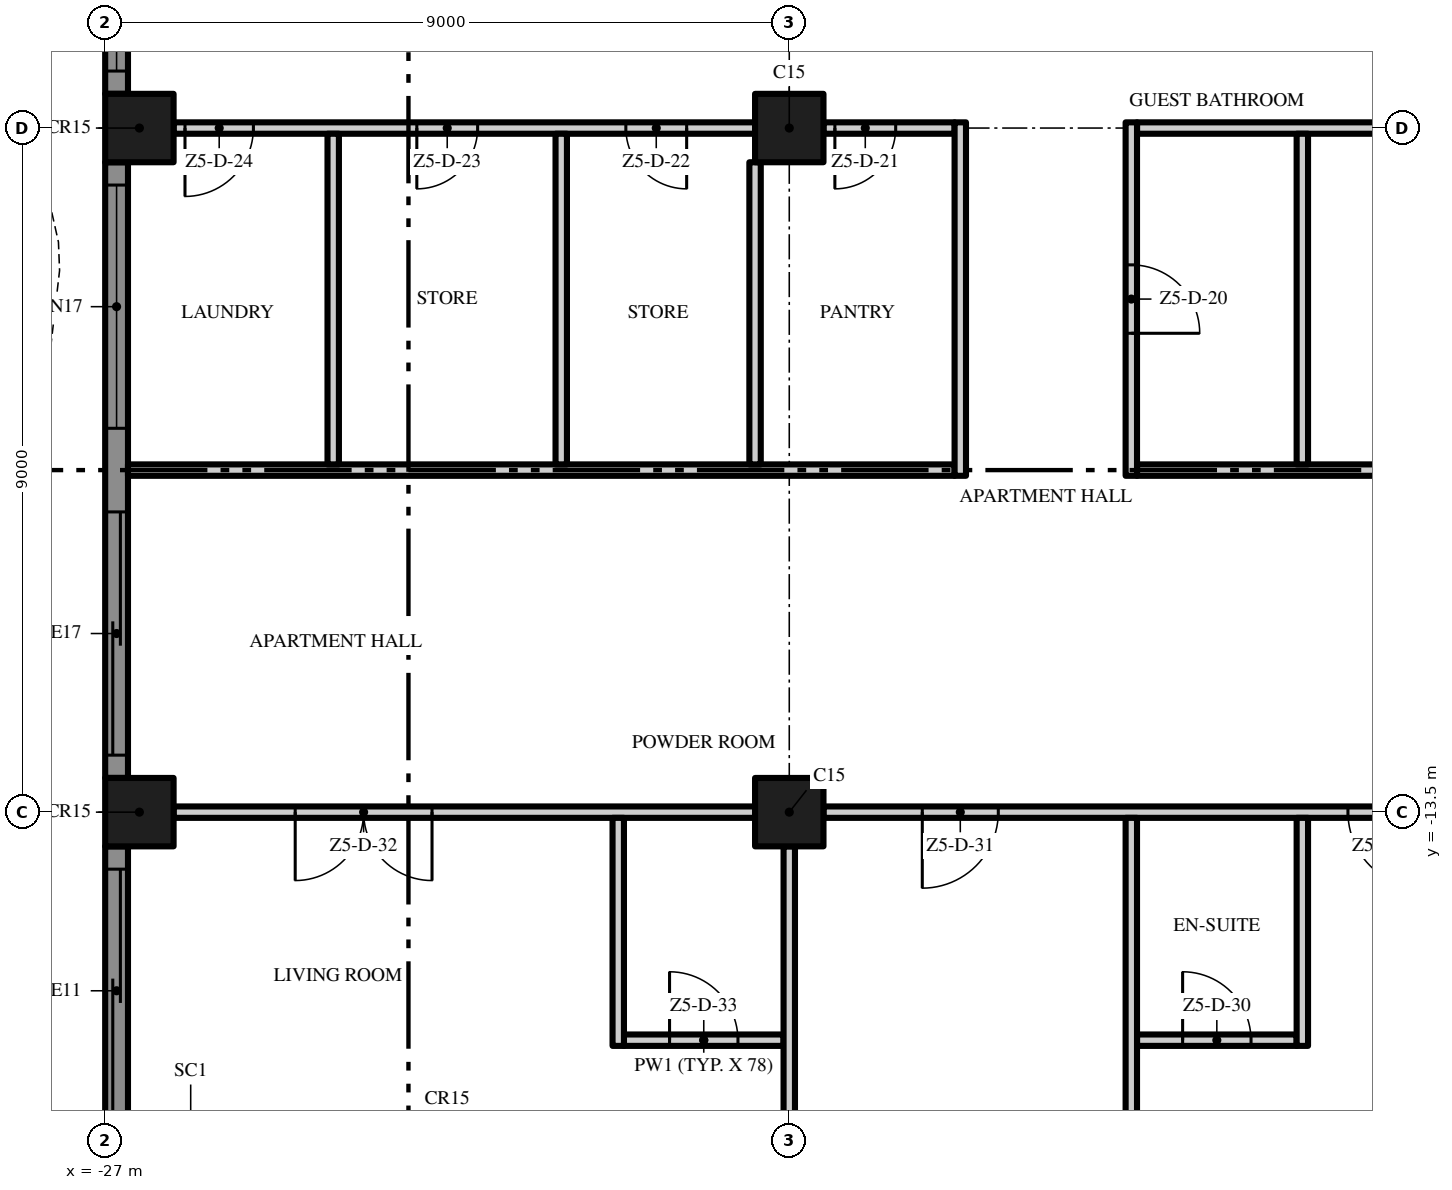
"""IFC4 building model, lengths in metres.
Left out: names, types, materials, properties, quantities, classifications, styles, units other than length and angle.
Written with IfcOpenShell. Run it as: python <this file> out.ifc"""

import sys

from ifc_helpers import new_model, si_unit, direction, frame, frame_2d, origin, origin_2d, place, context, subcontext, project, spatial, polyline, rectangle, outline, extrude, element, fill, save


model = new_model("IFC4")
c1 = context("Model", 3, precision=1e-05, world=origin(), true_north=direction((0.0, 1.0)))
c2 = subcontext(c1, "Body", "Model", "MODEL_VIEW")
j1 = project(units=[si_unit("LENGTHUNIT", "METRE"), si_unit("PLANEANGLEUNIT", "RADIAN")], contexts=[c1])
p1 = place(None, origin())
s1 = spatial("IfcSite", under=j1, at=p1, CompositionType="ELEMENT")
p2 = place(p1, origin())
s2 = spatial("IfcBuilding", under=s1, at=p2, CompositionType="ELEMENT")
p3 = place(p2, frame((0.0, 0.0, 276.8)))
s3 = spatial("IfcBuildingStorey", under=s2, at=p3, CompositionType="ELEMENT", Elevation=276.8)
for number, where, z_axis, x_axis in (
    (1, (-18.0, -13.5, 0.0), (0.0, 0.0, 1.0), (1.0, 0.0, 0.0)),
    (2, (-18.0, -4.5, 0.0), (0.0, 0.0, 1.0), (1.0, 0.0, 0.0)),
    (3, (-26.55, -13.5, 0.0), (0.0, 0.0, 1.0), (1.0, 0.0, 0.0)),
    (4, (-26.55, -4.5, 0.0), (0.0, 0.0, 1.0), (1.0, 0.0, 0.0)),
):
    element("IfcColumn", number, at=place(p3, frame(where, z_axis=z_axis, x_axis=x_axis)), inside=s3, PredefinedType="COLUMN", context=c2, shape_type="SweptSolid", body=[
        extrude(rectangle(XDim=0.9, YDim=0.9, at=origin_2d()), origin(), (0.0, 0.0, 1.0), 3.5),
    ])
p4 = place(p3, frame((-26.85, -4.05, 0.0), z_axis=(0.0, 0.0, 1.0), x_axis=(0.0, 1.0, 0.0)))
e5 = element("IfcWall", 5, at=p4, inside=s3, PredefinedType="SOLIDWALL", context=c2, shape_type="SweptSolid", body=[
    extrude(rectangle(XDim=8.1, YDim=0.3, at=frame_2d((4.05, 0.0))), origin(), (0.0, 0.0, 1.0), 3.5),
])
p5 = place(p4, frame((4.6, 0.0, 0.0)))
e6 = element("IfcOpeningElement", 6, at=p5, cuts=e5, PredefinedType="OPENING", context=c2, shape_type="SweptSolid", body=[
    extrude(rectangle(XDim=3.2, YDim=2.4, at=frame_2d((1.6, 1.2))), frame((0.0, 0.16, 0.0), z_axis=(0.0, -1.0, 0.0), x_axis=(1.0, 0.0, 0.0)), (0.0, 0.0, 1.0), 0.32),
])
p6 = place(p4, frame((0.3, 0.0, 0.45)))
e7 = element("IfcOpeningElement", 7, at=p6, cuts=e5, PredefinedType="OPENING", context=c2, shape_type="SweptSolid", body=[
    extrude(rectangle(XDim=3.2, YDim=2.65, at=frame_2d((1.6, 1.325))), frame((0.0, 0.16, 0.0), z_axis=(0.0, -1.0, 0.0), x_axis=(1.0, 0.0, 0.0)), (0.0, 0.0, 1.0), 0.32),
])
p7 = place(p3, frame((-26.85, -13.05, 0.0), z_axis=(0.0, 0.0, 1.0), x_axis=(0.0, 1.0, 0.0)))
e8 = element("IfcWall", 8, at=p7, inside=s3, PredefinedType="SOLIDWALL", context=c2, shape_type="SweptSolid", body=[
    extrude(rectangle(XDim=8.1, YDim=0.3, at=frame_2d((4.05, 0.0))), origin(), (0.0, 0.0, 1.0), 3.5),
])
p8 = place(p7, frame((4.6, 0.0, 0.45)))
e9 = element("IfcOpeningElement", 9, at=p8, cuts=e8, PredefinedType="OPENING", context=c2, shape_type="SweptSolid", body=[
    extrude(rectangle(XDim=3.2, YDim=2.65, at=frame_2d((1.6, 1.325))), frame((0.0, 0.16, 0.0), z_axis=(0.0, -1.0, 0.0), x_axis=(1.0, 0.0, 0.0)), (0.0, 0.0, 1.0), 0.32),
])
p9 = place(p7, frame((0.3, 0.0, 0.0)))
e10 = element("IfcOpeningElement", 10, at=p9, cuts=e8, PredefinedType="OPENING", context=c2, shape_type="SweptSolid", body=[
    extrude(rectangle(XDim=3.2, YDim=2.4, at=frame_2d((1.6, 1.2))), frame((0.0, 0.16, 0.0), z_axis=(0.0, -1.0, 0.0), x_axis=(1.0, 0.0, 0.0)), (0.0, 0.0, 1.0), 0.32),
])
p10 = place(p3, frame((-26.85, -18.0, 0.0), z_axis=(0.0, 0.0, 1.0), x_axis=(0.0, 1.0, 0.0)))
e11 = element("IfcWall", 11, at=p10, inside=s3, PredefinedType="SOLIDWALL", context=c2, shape_type="SweptSolid", body=[
    extrude(rectangle(XDim=4.05, YDim=0.3, at=frame_2d((2.025, 0.0))), origin(), (0.0, 0.0, 1.0), 3.5),
])
p11 = place(p10, frame((0.55, 0.0, 0.0)))
e12 = element("IfcOpeningElement", 12, at=p11, cuts=e11, PredefinedType="OPENING", context=c2, shape_type="SweptSolid", body=[
    extrude(rectangle(XDim=3.2, YDim=2.4, at=frame_2d((1.6, 1.2))), frame((0.0, 0.16, 0.0), z_axis=(0.0, -1.0, 0.0), x_axis=(1.0, 0.0, 0.0)), (0.0, 0.0, 1.0), 0.32),
])
p12 = place(p3, origin())
e13 = element("IfcWall", 13, at=p12, inside=s3, PredefinedType="USERDEFINED", context=c2, shape_type="SweptSolid", body=[
    extrude(outline(polyline([(-29.649, 18.0), (-29.985, 16.5), (-30.0, 16.125), (-29.869, 15.0), (-29.345, 13.5), (-28.612, 12.0), (-27.951, 10.5), (-27.615, 9.0), (-27.6, 8.625), (-27.731, 7.5), (-28.255, 6.0), (-28.988, 4.5), (-29.649, 3.0), (-29.985, 1.5), (-30.0, 1.125), (-29.869, 0.0), (-29.345, -1.5), (-28.612, -3.0), (-27.951, -4.5), (-27.615, -6.0), (-27.6, -6.375), (-27.731, -7.5), (-28.255, -9.0), (-28.988, -10.5), (-29.649, -12.0), (-29.985, -13.5), (-30.0, -13.875), (-29.869, -15.0), (-29.345, -16.5), (-28.612, -18.0), (-28.388, -17.89), (-29.114, -16.404), (-29.624, -14.944), (-29.749, -13.865), (-29.736, -13.533), (-29.41, -12.079), (-28.761, -10.605), (-28.024, -9.096), (-27.486, -7.556), (-27.349, -6.385), (-27.366, -5.967), (-27.713, -4.421), (-28.385, -2.895), (-29.114, -1.404), (-29.624, 0.056), (-29.749, 1.135), (-29.736, 1.467), (-29.41, 2.921), (-28.761, 4.395), (-28.024, 5.904), (-27.486, 7.444), (-27.349, 8.615), (-27.366, 9.033), (-27.713, 10.579), (-28.385, 12.105), (-29.114, 13.596), (-29.624, 15.056), (-29.749, 16.135), (-29.736, 16.467), (-29.405, 17.945), (-29.649, 18.0)])), origin(), (0.0, 0.0, 1.0), 0.9),
])
p13 = place(p3, frame((-20.175, -16.5, 0.0), z_axis=(0.0, 0.0, 1.0), x_axis=(1.0, 0.0, 0.0)))
e14 = element("IfcWall", 14, at=p13, inside=s3, PredefinedType="PARTITIONING", context=c2, shape_type="SweptSolid", body=[
    extrude(rectangle(XDim=2.1, YDim=0.15, at=frame_2d((1.05, 0.0))), origin(), (0.0, 0.0, 1.0), 3.5),
])
p14 = place(p13, frame((0.6, 0.0, 0.0)))
e15 = element("IfcOpeningElement", 15, at=p14, cuts=e14, PredefinedType="OPENING", context=c2, shape_type="SweptSolid", body=[
    extrude(rectangle(XDim=0.9, YDim=2.1, at=frame_2d((0.45, 1.05))), frame((0.0, 0.085, 0.0), z_axis=(0.0, -1.0, 0.0), x_axis=(1.0, 0.0, 0.0)), (0.0, 0.0, 1.0), 0.17),
])
p15 = place(p3, frame((-13.425, -16.5, 0.0), z_axis=(0.0, 0.0, 1.0), x_axis=(1.0, 0.0, 0.0)))
e16 = element("IfcWall", 16, at=p15, inside=s3, PredefinedType="PARTITIONING", context=c2, shape_type="SweptSolid", body=[
    extrude(rectangle(XDim=2.1, YDim=0.15, at=frame_2d((1.05, 0.0))), origin(), (0.0, 0.0, 1.0), 3.5),
])
p16 = place(p15, frame((0.6, 0.0, 0.0)))
e17 = element("IfcOpeningElement", 17, at=p16, cuts=e16, PredefinedType="OPENING", context=c2, shape_type="SweptSolid", body=[
    extrude(rectangle(XDim=0.9, YDim=2.1, at=frame_2d((0.45, 1.05))), frame((0.0, 0.085, 0.0), z_axis=(0.0, -1.0, 0.0), x_axis=(1.0, 0.0, 0.0)), (0.0, 0.0, 1.0), 0.17),
])
p17 = place(p3, frame((-18.45, -13.5, 0.0), z_axis=(0.0, 0.0, 1.0), x_axis=(-1.0, 0.0, 0.0)))
e18 = element("IfcWall", 18, at=p17, inside=s3, PredefinedType="PARTITIONING", context=c2, shape_type="SweptSolid", body=[
    extrude(rectangle(XDim=7.65, YDim=0.15, at=frame_2d((3.825, 0.0))), origin(), (0.0, 0.0, 1.0), 3.5),
])
p18 = place(p17, frame((4.25, 0.0, 0.0)))
e19 = element("IfcOpeningElement", 19, at=p18, cuts=e18, PredefinedType="OPENING", context=c2, shape_type="SweptSolid", body=[
    extrude(rectangle(XDim=1.8, YDim=2.4, at=frame_2d((0.9, 1.2))), frame((0.0, 0.085, 0.0), z_axis=(0.0, -1.0, 0.0), x_axis=(1.0, 0.0, 0.0)), (0.0, 0.0, 1.0), 0.17),
])
p19 = place(p3, frame((-9.45, -13.5, 0.0), z_axis=(0.0, 0.0, 1.0), x_axis=(-1.0, 0.0, 0.0)))
e20 = element("IfcWall", 20, at=p19, inside=s3, PredefinedType="PARTITIONING", context=c2, shape_type="SweptSolid", body=[
    extrude(rectangle(XDim=8.1, YDim=0.15, at=frame_2d((4.05, 0.0))), origin(), (0.0, 0.0, 1.0), 3.5),
])
p20 = place(p19, frame((0.2, 0.0, 0.0)))
e21 = element("IfcOpeningElement", 21, at=p20, cuts=e20, PredefinedType="OPENING", context=c2, shape_type="SweptSolid", body=[
    extrude(rectangle(XDim=1.0, YDim=2.4, at=frame_2d((0.5, 1.2))), frame((0.0, 0.085, 0.0), z_axis=(0.0, -1.0, 0.0), x_axis=(1.0, 0.0, 0.0)), (0.0, 0.0, 1.0), 0.17),
])
p21 = place(p19, frame((5.8, 0.0, 0.0)))
e22 = element("IfcOpeningElement", 22, at=p21, cuts=e20, PredefinedType="OPENING", context=c2, shape_type="SweptSolid", body=[
    extrude(rectangle(XDim=1.0, YDim=2.4, at=frame_2d((0.5, 1.2))), frame((0.0, 0.085, 0.0), z_axis=(0.0, -1.0, 0.0), x_axis=(1.0, 0.0, 0.0)), (0.0, 0.0, 1.0), 0.17),
])
p22 = place(p3, frame((-26.7, -9.0, 0.0), z_axis=(0.0, 0.0, 1.0), x_axis=(1.0, 0.0, 0.0)))
e23 = element("IfcWall", 23, at=p22, inside=s3, PredefinedType="PARTITIONING", context=c2, shape_type="SweptSolid", body=[
    extrude(rectangle(XDim=10.875, YDim=0.15, at=frame_2d((5.438, 0.0))), origin(), (0.0, 0.0, 1.0), 3.5),
])
p23 = place(p3, frame((-13.425, -9.0, 0.0), z_axis=(0.0, 0.0, 1.0), x_axis=(1.0, 0.0, 0.0)))
e24 = element("IfcWall", 24, at=p23, inside=s3, PredefinedType="PARTITIONING", context=c2, shape_type="SweptSolid", body=[
    extrude(rectangle(XDim=13.325, YDim=0.15, at=frame_2d((6.662, 0.0))), origin(), (0.0, 0.0, 1.0), 3.5),
])
p24 = place(p23, frame((4.675, 0.0, 0.0)))
e25 = element("IfcOpeningElement", 25, at=p24, cuts=e24, PredefinedType="OPENING", context=c2, shape_type="SweptSolid", body=[
    extrude(rectangle(XDim=1.0, YDim=2.4, at=frame_2d((0.5, 1.2))), frame((0.0, 0.085, 0.0), z_axis=(0.0, -1.0, 0.0), x_axis=(1.0, 0.0, 0.0)), (0.0, 0.0, 1.0), 0.17),
])
p25 = place(p3, frame((-18.45, -4.5, 0.0), z_axis=(0.0, 0.0, 1.0), x_axis=(-1.0, 0.0, 0.0)))
e26 = element("IfcWall", 26, at=p25, inside=s3, PredefinedType="PARTITIONING", context=c2, shape_type="SweptSolid", body=[
    extrude(rectangle(XDim=7.65, YDim=0.15, at=frame_2d((3.825, 0.0))), origin(), (0.0, 0.0, 1.0), 3.5),
])
p26 = place(p25, frame((0.9, 0.0, 0.0)))
e27 = element("IfcOpeningElement", 27, at=p26, cuts=e26, PredefinedType="OPENING", context=c2, shape_type="SweptSolid", body=[
    extrude(rectangle(XDim=0.8, YDim=2.0, at=frame_2d((0.4, 1.0))), frame((0.0, 0.085, 0.0), z_axis=(0.0, -1.0, 0.0), x_axis=(1.0, 0.0, 0.0)), (0.0, 0.0, 1.0), 0.17),
])
p27 = place(p25, frame((3.65, 0.0, 0.0)))
e28 = element("IfcOpeningElement", 28, at=p27, cuts=e26, PredefinedType="OPENING", context=c2, shape_type="SweptSolid", body=[
    extrude(rectangle(XDim=0.8, YDim=2.0, at=frame_2d((0.4, 1.0))), frame((0.0, 0.085, 0.0), z_axis=(0.0, -1.0, 0.0), x_axis=(1.0, 0.0, 0.0)), (0.0, 0.0, 1.0), 0.17),
])
p28 = place(p25, frame((6.6, 0.0, 0.0)))
e29 = element("IfcOpeningElement", 29, at=p28, cuts=e26, PredefinedType="OPENING", context=c2, shape_type="SweptSolid", body=[
    extrude(rectangle(XDim=0.9, YDim=2.1, at=frame_2d((0.45, 1.05))), frame((0.0, 0.085, 0.0), z_axis=(0.0, -1.0, 0.0), x_axis=(1.0, 0.0, 0.0)), (0.0, 0.0, 1.0), 0.17),
])
p29 = place(p3, frame((-15.825, -4.5, 0.0), z_axis=(0.0, 0.0, 1.0), x_axis=(-1.0, 0.0, 0.0)))
e30 = element("IfcWall", 30, at=p29, inside=s3, PredefinedType="PARTITIONING", context=c2, shape_type="SweptSolid", body=[
    extrude(rectangle(XDim=1.725, YDim=0.15, at=frame_2d((0.863, 0.0))), origin(), (0.0, 0.0, 1.0), 3.5),
])
p30 = place(p29, frame((0.775, 0.0, 0.0)))
e31 = element("IfcOpeningElement", 31, at=p30, cuts=e30, PredefinedType="OPENING", context=c2, shape_type="SweptSolid", body=[
    extrude(rectangle(XDim=0.8, YDim=2.0, at=frame_2d((0.4, 1.0))), frame((0.0, 0.085, 0.0), z_axis=(0.0, -1.0, 0.0), x_axis=(1.0, 0.0, 0.0)), (0.0, 0.0, 1.0), 0.17),
])
p31 = place(p3, frame((-13.425, -4.5, 0.0), z_axis=(0.0, 0.0, 1.0), x_axis=(1.0, 0.0, 0.0)))
e32 = element("IfcWall", 32, at=p31, inside=s3, PredefinedType="PARTITIONING", context=c2, shape_type="SweptSolid", body=[
    extrude(rectangle(XDim=3.975, YDim=0.15, at=frame_2d((1.988, 0.0))), origin(), (0.0, 0.0, 1.0), 3.5),
])
for number, where, z_axis, x_axis in (
    (33, (-24.0, -8.925, 0.0), (0.0, 0.0, 1.0), (0.0, 1.0, 0.0)),
    (34, (-21.0, -8.925, 0.0), (0.0, 0.0, 1.0), (0.0, 1.0, 0.0)),
):
    element("IfcWall", number, at=place(p3, frame(where, z_axis=z_axis, x_axis=x_axis)), inside=s3, PredefinedType="PARTITIONING", context=c2, shape_type="SweptSolid", body=[
        extrude(rectangle(XDim=4.35, YDim=0.15, at=frame_2d((2.175, 0.0))), origin(), (0.0, 0.0, 1.0), 3.5),
    ])
p32 = place(p3, frame((-20.25, -16.575, 0.0), z_axis=(0.0, 0.0, 1.0), x_axis=(0.0, 1.0, 0.0)))
e35 = element("IfcWall", 35, at=p32, inside=s3, PredefinedType="PARTITIONING", context=c2, shape_type="SweptSolid", body=[
    extrude(rectangle(XDim=3.0, YDim=0.15, at=frame_2d((1.5, 0.0))), origin(), (0.0, 0.0, 1.0), 3.5),
])
p33 = place(p3, frame((-18.45, -8.925, 0.0), z_axis=(0.0, 0.0, 1.0), x_axis=(0.0, 1.0, 0.0)))
e36 = element("IfcWall", 36, at=p33, inside=s3, PredefinedType="PARTITIONING", context=c2, shape_type="SweptSolid", body=[
    extrude(rectangle(XDim=3.975, YDim=0.15, at=frame_2d((1.988, 0.0))), origin(), (0.0, 0.0, 1.0), 3.5),
])
p34 = place(p3, frame((-18.0, -21.6, 0.0), z_axis=(0.0, 0.0, 1.0), x_axis=(0.0, 1.0, 0.0)))
e37 = element("IfcWall", 37, at=p34, inside=s3, PredefinedType="PARTITIONING", context=c2, shape_type="SweptSolid", body=[
    extrude(rectangle(XDim=7.65, YDim=0.15, at=frame_2d((3.825, 0.0))), origin(), (0.0, 0.0, 1.0), 3.5),
])
p35 = place(p3, frame((-15.75, -9.075, 0.0), z_axis=(0.0, 0.0, 1.0), x_axis=(0.0, 1.0, 0.0)))
e38 = element("IfcWall", 38, at=p35, inside=s3, PredefinedType="PARTITIONING", context=c2, shape_type="SweptSolid", body=[
    extrude(rectangle(XDim=4.65, YDim=0.15, at=frame_2d((2.325, 0.0))), origin(), (0.0, 0.0, 1.0), 3.5),
])
p36 = place(p3, frame((-13.5, -22.2, 0.0), z_axis=(0.0, 0.0, 1.0), x_axis=(0.0, 1.0, 0.0)))
e39 = element("IfcWall", 39, at=p36, inside=s3, PredefinedType="PARTITIONING", context=c2, shape_type="SweptSolid", body=[
    extrude(rectangle(XDim=8.625, YDim=0.15, at=frame_2d((4.312, 0.0))), origin(), (0.0, 0.0, 1.0), 3.5),
])
p37 = place(p3, frame((-13.5, -4.425, 0.0), z_axis=(0.0, 0.0, 1.0), x_axis=(0.0, -1.0, 0.0)))
e40 = element("IfcWall", 40, at=p37, inside=s3, PredefinedType="PARTITIONING", context=c2, shape_type="SweptSolid", body=[
    extrude(rectangle(XDim=4.65, YDim=0.15, at=frame_2d((2.325, 0.0))), origin(), (0.0, 0.0, 1.0), 3.5),
])
p38 = place(p37, frame((1.875, 0.0, 0.0)))
e41 = element("IfcOpeningElement", 41, at=p38, cuts=e40, PredefinedType="OPENING", context=c2, shape_type="SweptSolid", body=[
    extrude(rectangle(XDim=0.9, YDim=2.1, at=frame_2d((0.45, 1.05))), frame((0.0, 0.085, 0.0), z_axis=(0.0, -1.0, 0.0), x_axis=(1.0, 0.0, 0.0)), (0.0, 0.0, 1.0), 0.17),
])
p39 = place(p3, frame((-11.25, -16.575, 0.0), z_axis=(0.0, 0.0, 1.0), x_axis=(0.0, 1.0, 0.0)))
e42 = element("IfcWall", 42, at=p39, inside=s3, PredefinedType="PARTITIONING", context=c2, shape_type="SweptSolid", body=[
    extrude(rectangle(XDim=3.0, YDim=0.15, at=frame_2d((1.5, 0.0))), origin(), (0.0, 0.0, 1.0), 3.5),
])
p40 = place(p3, frame((-11.25, -8.925, 0.0), z_axis=(0.0, 0.0, 1.0), x_axis=(0.0, 1.0, 0.0)))
e43 = element("IfcWall", 43, at=p40, inside=s3, PredefinedType="PARTITIONING", context=c2, shape_type="SweptSolid", body=[
    extrude(rectangle(XDim=4.35, YDim=0.15, at=frame_2d((2.175, 0.0))), origin(), (0.0, 0.0, 1.0), 3.5),
])
p41 = place(p6, origin())
e44 = element("IfcWindow", 44, at=p41, inside=s3, PartitioningType="SINGLE_PANEL", PredefinedType="WINDOW", context=c2, shape_type="SweptSolid", body=[
    extrude(rectangle(XDim=3.2, YDim=2.65, at=frame_2d((1.6, 1.325))), frame((0.0, 0.03, 0.0), z_axis=(0.0, -1.0, 0.0), x_axis=(1.0, 0.0, 0.0)), (0.0, 0.0, 1.0), 0.06),
])
fill(e7, e44)
p42 = place(p8, origin())
e45 = element("IfcWindow", 45, at=p42, inside=s3, PartitioningType="SINGLE_PANEL", PredefinedType="WINDOW", context=c2, shape_type="SweptSolid", body=[
    extrude(rectangle(XDim=3.2, YDim=2.65, at=frame_2d((1.6, 1.325))), frame((0.0, 0.03, 0.0), z_axis=(0.0, -1.0, 0.0), x_axis=(1.0, 0.0, 0.0)), (0.0, 0.0, 1.0), 0.06),
])
fill(e9, e45)
p43 = place(p9, origin())
e46 = element("IfcDoor", 46, at=p43, inside=s3, OperationType="SINGLE_SWING_LEFT", PredefinedType="DOOR", context=c2, shape_type="SweptSolid", body=[
    extrude(rectangle(XDim=3.2, YDim=2.4, at=frame_2d((1.6, 1.2))), frame((0.0, 0.025, 0.0), z_axis=(0.0, -1.0, 0.0), x_axis=(1.0, 0.0, 0.0)), (0.0, 0.0, 1.0), 0.05),
])
fill(e10, e46)
p44 = place(p11, origin())
e47 = element("IfcDoor", 47, at=p44, inside=s3, OperationType="SINGLE_SWING_LEFT", PredefinedType="DOOR", context=c2, shape_type="SweptSolid", body=[
    extrude(rectangle(XDim=3.2, YDim=2.4, at=frame_2d((1.6, 1.2))), frame((0.0, 0.025, 0.0), z_axis=(0.0, -1.0, 0.0), x_axis=(1.0, 0.0, 0.0)), (0.0, 0.0, 1.0), 0.05),
])
fill(e12, e47)
p45 = place(p38, origin())
e48 = element("IfcDoor", 48, at=p45, inside=s3, OperationType="SINGLE_SWING_RIGHT", PredefinedType="DOOR", context=c2, shape_type="SweptSolid", body=[
    extrude(rectangle(XDim=0.9, YDim=2.1, at=frame_2d((0.45, 1.05))), frame((0.0, 0.025, 0.0), z_axis=(0.0, -1.0, 0.0), x_axis=(1.0, 0.0, 0.0)), (0.0, 0.0, 1.0), 0.05),
])
fill(e41, e48)
p46 = place(p30, origin())
e49 = element("IfcDoor", 49, at=p46, inside=s3, OperationType="SINGLE_SWING_RIGHT", PredefinedType="DOOR", context=c2, shape_type="SweptSolid", body=[
    extrude(rectangle(XDim=0.8, YDim=2.0, at=frame_2d((0.4, 1.0))), frame((0.0, 0.025, 0.0), z_axis=(0.0, -1.0, 0.0), x_axis=(1.0, 0.0, 0.0)), (0.0, 0.0, 1.0), 0.05),
])
fill(e31, e49)
p47 = place(p26, origin())
e50 = element("IfcDoor", 50, at=p47, inside=s3, OperationType="SINGLE_SWING_LEFT", PredefinedType="DOOR", context=c2, shape_type="SweptSolid", body=[
    extrude(rectangle(XDim=0.8, YDim=2.0, at=frame_2d((0.4, 1.0))), frame((0.0, 0.025, 0.0), z_axis=(0.0, -1.0, 0.0), x_axis=(1.0, 0.0, 0.0)), (0.0, 0.0, 1.0), 0.05),
])
fill(e27, e50)
p48 = place(p27, origin())
e51 = element("IfcDoor", 51, at=p48, inside=s3, OperationType="SINGLE_SWING_RIGHT", PredefinedType="DOOR", context=c2, shape_type="SweptSolid", body=[
    extrude(rectangle(XDim=0.8, YDim=2.0, at=frame_2d((0.4, 1.0))), frame((0.0, 0.025, 0.0), z_axis=(0.0, -1.0, 0.0), x_axis=(1.0, 0.0, 0.0)), (0.0, 0.0, 1.0), 0.05),
])
fill(e28, e51)
p49 = place(p28, origin())
e52 = element("IfcDoor", 52, at=p49, inside=s3, OperationType="SINGLE_SWING_RIGHT", PredefinedType="DOOR", context=c2, shape_type="SweptSolid", body=[
    extrude(rectangle(XDim=0.9, YDim=2.1, at=frame_2d((0.45, 1.05))), frame((0.0, 0.025, 0.0), z_axis=(0.0, -1.0, 0.0), x_axis=(1.0, 0.0, 0.0)), (0.0, 0.0, 1.0), 0.05),
])
fill(e29, e52)
p50 = place(p20, origin())
e53 = element("IfcDoor", 53, at=p50, inside=s3, OperationType="SINGLE_SWING_LEFT", PredefinedType="DOOR", context=c2, shape_type="SweptSolid", body=[
    extrude(rectangle(XDim=1.0, YDim=2.4, at=frame_2d((0.5, 1.2))), frame((0.0, 0.025, 0.0), z_axis=(0.0, -1.0, 0.0), x_axis=(1.0, 0.0, 0.0)), (0.0, 0.0, 1.0), 0.05),
])
fill(e21, e53)
p51 = place(p16, origin())
e54 = element("IfcDoor", 54, at=p51, inside=s3, OperationType="SINGLE_SWING_LEFT", PredefinedType="DOOR", context=c2, shape_type="SweptSolid", body=[
    extrude(rectangle(XDim=0.9, YDim=2.1, at=frame_2d((0.45, 1.05))), frame((0.0, 0.025, 0.0), z_axis=(0.0, -1.0, 0.0), x_axis=(1.0, 0.0, 0.0)), (0.0, 0.0, 1.0), 0.05),
])
fill(e17, e54)
p52 = place(p21, origin())
e55 = element("IfcDoor", 55, at=p52, inside=s3, OperationType="SINGLE_SWING_RIGHT", PredefinedType="DOOR", context=c2, shape_type="SweptSolid", body=[
    extrude(rectangle(XDim=1.0, YDim=2.4, at=frame_2d((0.5, 1.2))), frame((0.0, 0.025, 0.0), z_axis=(0.0, -1.0, 0.0), x_axis=(1.0, 0.0, 0.0)), (0.0, 0.0, 1.0), 0.05),
])
fill(e22, e55)
p53 = place(p18, origin())
e56 = element("IfcDoor", 56, at=p53, inside=s3, OperationType="DOUBLE_DOOR_SINGLE_SWING", PredefinedType="DOOR", context=c2, shape_type="SweptSolid", body=[
    extrude(rectangle(XDim=1.8, YDim=2.4, at=frame_2d((0.9, 1.2))), frame((0.0, 0.025, 0.0), z_axis=(0.0, -1.0, 0.0), x_axis=(1.0, 0.0, 0.0)), (0.0, 0.0, 1.0), 0.05),
])
fill(e19, e56)
p54 = place(p14, origin())
e57 = element("IfcDoor", 57, at=p54, inside=s3, OperationType="SINGLE_SWING_LEFT", PredefinedType="DOOR", context=c2, shape_type="SweptSolid", body=[
    extrude(rectangle(XDim=0.9, YDim=2.1, at=frame_2d((0.45, 1.05))), frame((0.0, 0.025, 0.0), z_axis=(0.0, -1.0, 0.0), x_axis=(1.0, 0.0, 0.0)), (0.0, 0.0, 1.0), 0.05),
])
fill(e15, e57)
save(model, sys.argv[1])
